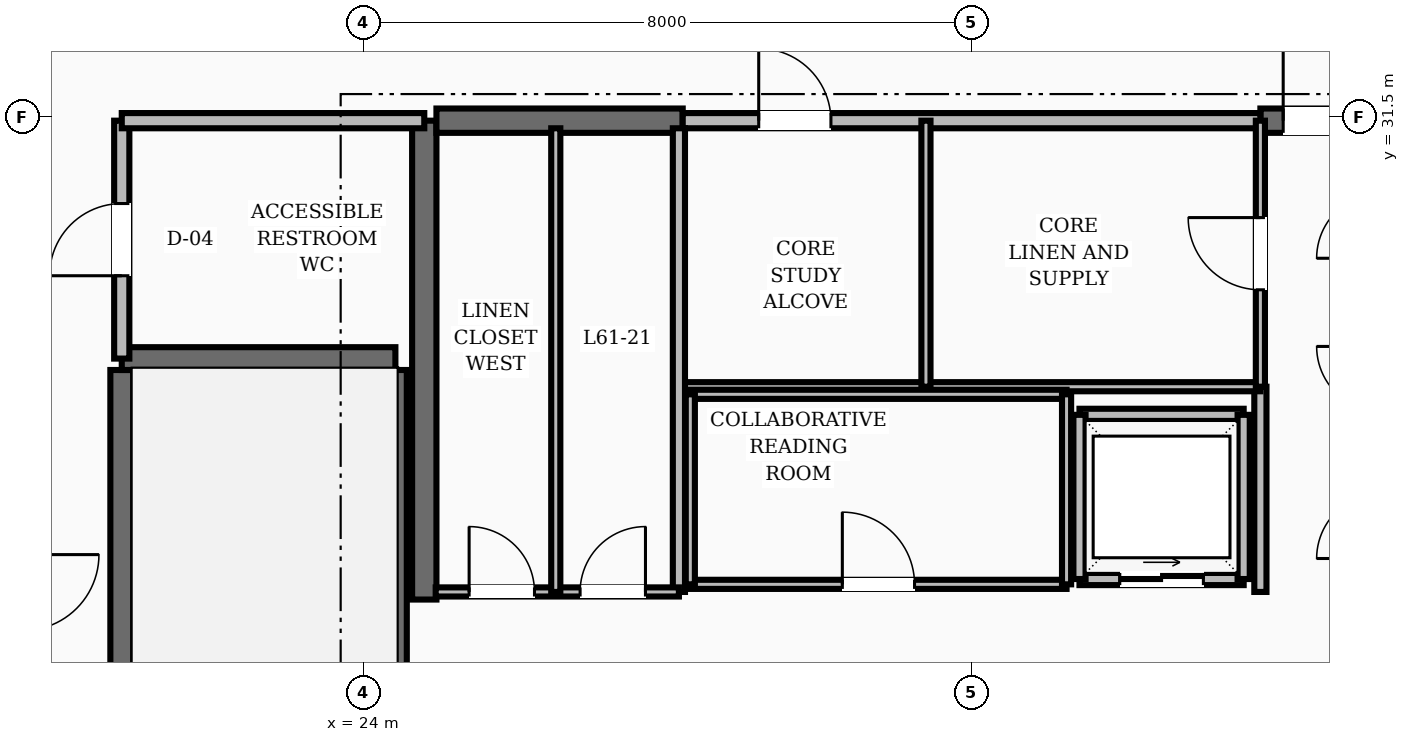
"""IFC4 building model, lengths in metres.
Left out: names, types, materials, properties, quantities, classifications, styles, units other than length and angle.
Written with IfcOpenShell. Run it as: python <this file> out.ifc"""

import sys

from ifc_helpers import new_model, si_unit, direction, frame, frame_2d, origin, place, context, subcontext, project, spatial, rectangle, extrude, element, fill, save


model = new_model("IFC4")
c1 = context("Model", 3, precision=1e-05, world=origin(), true_north=direction((0.0, 1.0)))
c2 = subcontext(c1, "Body", "Model", "MODEL_VIEW")
j1 = project(units=[si_unit("LENGTHUNIT", "METRE"), si_unit("PLANEANGLEUNIT", "RADIAN")], contexts=[c1])
p1 = place(None, origin())
s1 = spatial("IfcSite", under=j1, at=p1, CompositionType="ELEMENT")
p2 = place(p1, origin())
s2 = spatial("IfcBuilding", under=s1, at=p2, CompositionType="ELEMENT")
p3 = place(p2, frame((0.0, 0.0, 236.4)))
s3 = spatial("IfcBuildingStorey", under=s2, at=p3, CompositionType="ELEMENT", Elevation=236.4)
p4 = place(p3, frame((24.8, 25.15, 0.0), z_axis=(0.0, 0.0, 1.0), x_axis=(0.0, 1.0, 0.0)))
e1 = element("IfcWall", 1, at=p4, inside=s3, PredefinedType="SHEAR", context=c2, shape_type="SweptSolid", body=[
    extrude(rectangle(XDim=6.3, YDim=0.32, at=frame_2d((3.15, 0.0))), origin(), (0.0, 0.0, 1.0), 3.6),
])
p5 = place(p3, frame((24.96, 31.45, 0.0), z_axis=(0.0, 0.0, 1.0), x_axis=(1.0, 0.0, 0.0)))
e2 = element("IfcWall", 2, at=p5, inside=s3, PredefinedType="SHEAR", context=c2, shape_type="SweptSolid", body=[
    extrude(rectangle(XDim=3.24, YDim=0.32, at=frame_2d((1.62, 0.0))), origin(), (0.0, 0.0, 1.0), 3.6),
])
p6 = place(p3, frame((35.8, 31.45, 0.0), z_axis=(0.0, 0.0, 1.0), x_axis=(1.0, 0.0, 0.0)))
e3 = element("IfcWall", 3, at=p6, inside=s3, PredefinedType="SHEAR", context=c2, shape_type="SweptSolid", body=[
    extrude(rectangle(XDim=3.24, YDim=0.32, at=frame_2d((1.62, 0.0))), origin(), (0.0, 0.0, 1.0), 3.6),
])
p7 = place(p6, frame((0.3, 0.0, 0.0)))
e4 = element("IfcOpeningElement", 4, at=p7, cuts=e3, PredefinedType="OPENING", context=c2, shape_type="SweptSolid", body=[
    extrude(rectangle(XDim=1.1, YDim=2.1, at=frame_2d((0.55, 1.05))), frame((0.0, 0.17, 0.0), z_axis=(0.0, -1.0, 0.0), x_axis=(1.0, 0.0, 0.0)), (0.0, 0.0, 1.0), 0.34),
])
for number, where, z_axis, x_axis in (
    (5, (20.82, 19.43, 0.0), (0.0, 0.0, 1.0), (0.0, 1.0, 0.0)),
    (6, (24.42, 19.43, 0.0), (0.0, 0.0, 1.0), (0.0, 1.0, 0.0)),
):
    element("IfcWall", number, at=place(p3, frame(where, z_axis=z_axis, x_axis=x_axis)), inside=s3, PredefinedType="SHEAR", context=c2, shape_type="SweptSolid", body=[
        extrude(rectangle(XDim=8.74, YDim=0.3, at=frame_2d((4.37, 0.0))), origin(), (0.0, 0.0, 1.0), 3.6),
    ])
p8 = place(p3, frame((20.82, 28.32, 0.0), z_axis=(0.0, 0.0, 1.0), x_axis=(1.0, 0.0, 0.0)))
e7 = element("IfcWall", 7, at=p8, inside=s3, PredefinedType="SHEAR", context=c2, shape_type="SweptSolid", body=[
    extrude(rectangle(XDim=3.6, YDim=0.3, at=frame_2d((1.8, 0.0))), origin(), (0.0, 0.0, 1.0), 3.6),
])
p9 = place(p3, frame((20.82, 28.32, 0.0), z_axis=(0.0, 0.0, 1.0), x_axis=(0.0, 1.0, 0.0)))
e8 = element("IfcWall", 8, at=p9, inside=s3, PredefinedType="SOLIDWALL", context=c2, shape_type="SweptSolid", body=[
    extrude(rectangle(XDim=3.13, YDim=0.2, at=frame_2d((1.565, 0.0))), origin(), (0.0, 0.0, 1.0), 2.87),
])
p10 = place(p9, frame((1.09, 0.0, 0.0)))
e9 = element("IfcOpeningElement", 9, at=p10, cuts=e8, PredefinedType="OPENING", context=c2, shape_type="SweptSolid", body=[
    extrude(rectangle(XDim=0.95, YDim=2.1, at=frame_2d((0.475, 1.05))), frame((0.0, 0.11, 0.0), z_axis=(0.0, -1.0, 0.0), x_axis=(1.0, 0.0, 0.0)), (0.0, 0.0, 1.0), 0.22),
])
p11 = place(p3, frame((20.82, 31.45, 0.0), z_axis=(0.0, 0.0, 1.0), x_axis=(1.0, 0.0, 0.0)))
e10 = element("IfcWall", 10, at=p11, inside=s3, PredefinedType="SOLIDWALL", context=c2, shape_type="SweptSolid", body=[
    extrude(rectangle(XDim=3.98, YDim=0.2, at=frame_2d((1.99, 0.0))), origin(), (0.0, 0.0, 1.0), 2.87),
])
p12 = place(p3, frame((35.8, 25.25, 0.0), z_axis=(0.0, 0.0, 1.0), x_axis=(0.0, 1.0, 0.0)))
e11 = element("IfcWall", 11, at=p12, inside=s3, PredefinedType="SOLIDWALL", context=c2, shape_type="SweptSolid", body=[
    extrude(rectangle(XDim=2.7, YDim=0.16, at=frame_2d((1.35, 0.0))), origin(), (0.0, 0.0, 1.0), 2.87),
])
p13 = place(p3, frame((33.42, 25.42, 0.0), z_axis=(0.0, 0.0, 1.0), x_axis=(1.0, 0.0, 0.0)))
e12 = element("IfcWall", 12, at=p13, inside=s3, PredefinedType="SOLIDWALL", context=c2, shape_type="SweptSolid", body=[
    extrude(rectangle(XDim=2.16, YDim=0.16, at=frame_2d((1.08, 0.0))), origin(), (0.0, 0.0, 1.0), 2.87),
])
p14 = place(p13, frame((0.53, 0.0, 0.0)))
e13 = element("IfcOpeningElement", 13, at=p14, cuts=e12, PredefinedType="OPENING", context=c2, shape_type="SweptSolid", body=[
    extrude(rectangle(XDim=1.1, YDim=2.15, at=frame_2d((0.55, 1.075))), frame((0.0, 0.09, 0.0), z_axis=(0.0, -1.0, 0.0), x_axis=(1.0, 0.0, 0.0)), (0.0, 0.0, 1.0), 0.18),
])
for number, where, z_axis, x_axis in (
    (14, (33.42, 27.58, 0.0), (0.0, 0.0, 1.0), (1.0, 0.0, 0.0)),
    (15, (33.42, 25.42, 0.0), (0.0, 0.0, 1.0), (0.0, 1.0, 0.0)),
    (16, (35.58, 25.42, 0.0), (0.0, 0.0, 1.0), (0.0, 1.0, 0.0)),
):
    element("IfcWall", number, at=place(p3, frame(where, z_axis=z_axis, x_axis=x_axis)), inside=s3, PredefinedType="SOLIDWALL", context=c2, shape_type="SweptSolid", body=[
        extrude(rectangle(XDim=2.16, YDim=0.16, at=frame_2d((1.08, 0.0))), origin(), (0.0, 0.0, 1.0), 2.87),
    ])
p15 = place(p3, frame((28.2, 31.45, 0.0), z_axis=(0.0, 0.0, 1.0), x_axis=(1.0, 0.0, 0.0)))
e17 = element("IfcWall", 17, at=p15, inside=s3, PredefinedType="SOLIDWALL", context=c2, shape_type="SweptSolid", body=[
    extrude(rectangle(XDim=7.6, YDim=0.2, at=frame_2d((3.8, 0.0))), origin(), (0.0, 0.0, 1.0), 2.87),
])
p16 = place(p15, frame((1.0, 0.0, 0.0)))
e18 = element("IfcOpeningElement", 18, at=p16, cuts=e17, PredefinedType="OPENING", context=c2, shape_type="SweptSolid", body=[
    extrude(rectangle(XDim=0.95, YDim=2.1, at=frame_2d((0.475, 1.05))), frame((0.0, 0.11, 0.0), z_axis=(0.0, -1.0, 0.0), x_axis=(1.0, 0.0, 0.0)), (0.0, 0.0, 1.0), 0.22),
])
p17 = place(p3, frame((28.2, 27.95, 0.0), z_axis=(0.0, 0.0, 1.0), x_axis=(1.0, 0.0, 0.0)))
e19 = element("IfcWall", 19, at=p17, inside=s3, PredefinedType="PARTITIONING", context=c2, shape_type="SweptSolid", body=[
    extrude(rectangle(XDim=7.6, YDim=0.12, at=frame_2d((3.8, 0.0))), origin(), (0.0, 0.0, 1.0), 2.87),
])
p18 = place(p3, frame((35.8, 27.95, 0.0), z_axis=(0.0, 0.0, 1.0), x_axis=(0.0, 1.0, 0.0)))
e20 = element("IfcWall", 20, at=p18, inside=s3, PredefinedType="PARTITIONING", context=c2, shape_type="SweptSolid", body=[
    extrude(rectangle(XDim=3.5, YDim=0.12, at=frame_2d((1.75, 0.0))), origin(), (0.0, 0.0, 1.0), 2.87),
])
p19 = place(p18, frame((1.275, 0.0, 0.0)))
e21 = element("IfcOpeningElement", 21, at=p19, cuts=e20, PredefinedType="OPENING", context=c2, shape_type="SweptSolid", body=[
    extrude(rectangle(XDim=0.95, YDim=2.1, at=frame_2d((0.475, 1.05))), frame((0.0, 0.07, 0.0), z_axis=(0.0, -1.0, 0.0), x_axis=(1.0, 0.0, 0.0)), (0.0, 0.0, 1.0), 0.14),
])
p20 = place(p3, frame((31.4, 27.95, 0.0), z_axis=(0.0, 0.0, 1.0), x_axis=(0.0, 1.0, 0.0)))
e22 = element("IfcWall", 22, at=p20, inside=s3, PredefinedType="PARTITIONING", context=c2, shape_type="SweptSolid", body=[
    extrude(rectangle(XDim=3.5, YDim=0.12, at=frame_2d((1.75, 0.0))), origin(), (0.0, 0.0, 1.0), 2.87),
])
p21 = place(p3, frame((28.3, 25.35, 0.0), z_axis=(0.0, 0.0, 1.0), x_axis=(1.0, 0.0, 0.0)))
e23 = element("IfcWall", 23, at=p21, inside=s3, PredefinedType="PARTITIONING", context=c2, shape_type="SweptSolid", body=[
    extrude(rectangle(XDim=4.95, YDim=0.12, at=frame_2d((2.475, 0.0))), origin(), (0.0, 0.0, 1.0), 2.87),
])
p22 = place(p21, frame((2.0, 0.0, 0.0)))
e24 = element("IfcOpeningElement", 24, at=p22, cuts=e23, PredefinedType="OPENING", context=c2, shape_type="SweptSolid", body=[
    extrude(rectangle(XDim=0.95, YDim=2.1, at=frame_2d((0.475, 1.05))), frame((0.0, 0.07, 0.0), z_axis=(0.0, -1.0, 0.0), x_axis=(1.0, 0.0, 0.0)), (0.0, 0.0, 1.0), 0.14),
])
p23 = place(p3, frame((28.3, 27.85, 0.0), z_axis=(0.0, 0.0, 1.0), x_axis=(1.0, 0.0, 0.0)))
e25 = element("IfcWall", 25, at=p23, inside=s3, PredefinedType="PARTITIONING", context=c2, shape_type="SweptSolid", body=[
    extrude(rectangle(XDim=4.95, YDim=0.12, at=frame_2d((2.475, 0.0))), origin(), (0.0, 0.0, 1.0), 2.87),
])
for number, where, z_axis, x_axis in (
    (26, (28.3, 25.35, 0.0), (0.0, 0.0, 1.0), (0.0, 1.0, 0.0)),
    (27, (33.25, 25.35, 0.0), (0.0, 0.0, 1.0), (0.0, 1.0, 0.0)),
):
    element("IfcWall", number, at=place(p3, frame(where, z_axis=z_axis, x_axis=x_axis)), inside=s3, PredefinedType="PARTITIONING", context=c2, shape_type="SweptSolid", body=[
        extrude(rectangle(XDim=2.5, YDim=0.12, at=frame_2d((1.25, 0.0))), origin(), (0.0, 0.0, 1.0), 2.87),
    ])
p24 = place(p3, frame((28.15, 25.25, 0.0), z_axis=(0.0, 0.0, 1.0), x_axis=(0.0, 1.0, 0.0)))
e28 = element("IfcWall", 28, at=p24, inside=s3, PredefinedType="SOLIDWALL", context=c2, shape_type="SweptSolid", body=[
    extrude(rectangle(XDim=6.1, YDim=0.16, at=frame_2d((3.05, 0.0))), origin(), (0.0, 0.0, 1.0), 2.87),
])
p25 = place(p3, frame((24.95, 25.25, 0.0), z_axis=(0.0, 0.0, 1.0), x_axis=(1.0, 0.0, 0.0)))
e29 = element("IfcWall", 29, at=p25, inside=s3, PredefinedType="PARTITIONING", context=c2, shape_type="SweptSolid", body=[
    extrude(rectangle(XDim=3.2, YDim=0.12, at=frame_2d((1.6, 0.0))), origin(), (0.0, 0.0, 1.0), 2.87),
])
p26 = place(p25, frame((0.44, 0.0, 0.0)))
e30 = element("IfcOpeningElement", 30, at=p26, cuts=e29, PredefinedType="OPENING", context=c2, shape_type="SweptSolid", body=[
    extrude(rectangle(XDim=0.86, YDim=2.1, at=frame_2d((0.43, 1.05))), frame((0.0, 0.07, 0.0), z_axis=(0.0, -1.0, 0.0), x_axis=(1.0, 0.0, 0.0)), (0.0, 0.0, 1.0), 0.14),
])
p27 = place(p25, frame((1.9, 0.0, 0.0)))
e31 = element("IfcOpeningElement", 31, at=p27, cuts=e29, PredefinedType="OPENING", context=c2, shape_type="SweptSolid", body=[
    extrude(rectangle(XDim=0.86, YDim=2.1, at=frame_2d((0.43, 1.05))), frame((0.0, 0.07, 0.0), z_axis=(0.0, -1.0, 0.0), x_axis=(1.0, 0.0, 0.0)), (0.0, 0.0, 1.0), 0.14),
])
p28 = place(p3, frame((26.53, 25.25, 0.0), z_axis=(0.0, 0.0, 1.0), x_axis=(0.0, 1.0, 0.0)))
e32 = element("IfcWall", 32, at=p28, inside=s3, PredefinedType="PARTITIONING", context=c2, shape_type="SweptSolid", body=[
    extrude(rectangle(XDim=6.1, YDim=0.12, at=frame_2d((3.05, 0.0))), origin(), (0.0, 0.0, 1.0), 2.87),
])
p29 = place(p3, frame((21.635, 34.365, 0.0), z_axis=(0.0, 0.0, 1.0), x_axis=(-0.707106781187, -0.707106781187, 0.0)))
e33 = element("IfcWall", 33, at=p29, inside=s3, PredefinedType="SOLIDWALL", context=c2, shape_type="SweptSolid", body=[
    extrude(rectangle(XDim=2.916, YDim=0.16, at=frame_2d((1.458, 0.0))), origin(), (0.0, 0.0, 1.0), 2.87),
])
p30 = place(p10, origin())
e34 = element("IfcDoor", 34, at=p30, inside=s3, OperationType="SINGLE_SWING_LEFT", PredefinedType="DOOR", context=c2, shape_type="SweptSolid", body=[
    extrude(rectangle(XDim=0.95, YDim=2.1, at=frame_2d((0.475, 1.05))), frame((0.0, 0.025, 0.0), z_axis=(0.0, -1.0, 0.0), x_axis=(1.0, 0.0, 0.0)), (0.0, 0.0, 1.0), 0.05),
])
fill(e9, e34)
p31 = place(p7, origin())
e35 = element("IfcDoor", 35, at=p31, inside=s3, OperationType="SINGLE_SWING_LEFT", PredefinedType="DOOR", context=c2, shape_type="SweptSolid", body=[
    extrude(rectangle(XDim=1.1, YDim=2.1, at=frame_2d((0.55, 1.05))), frame((0.0, 0.025, 0.0), z_axis=(0.0, -1.0, 0.0), x_axis=(1.0, 0.0, 0.0)), (0.0, 0.0, 1.0), 0.05),
])
fill(e4, e35)
p32 = place(p14, origin())
e36 = element("IfcDoor", 36, at=p32, inside=s3, OperationType="SLIDING_TO_RIGHT", PredefinedType="DOOR", context=c2, shape_type="SweptSolid", body=[
    extrude(rectangle(XDim=1.1, YDim=2.15, at=frame_2d((0.55, 1.075))), frame((0.0, 0.025, 0.0), z_axis=(0.0, -1.0, 0.0), x_axis=(1.0, 0.0, 0.0)), (0.0, 0.0, 1.0), 0.05),
])
fill(e13, e36)
p33 = place(p16, origin())
e37 = element("IfcDoor", 37, at=p33, inside=s3, OperationType="SINGLE_SWING_LEFT", PredefinedType="DOOR", context=c2, shape_type="SweptSolid", body=[
    extrude(rectangle(XDim=0.95, YDim=2.1, at=frame_2d((0.475, 1.05))), frame((0.0, 0.025, 0.0), z_axis=(0.0, -1.0, 0.0), x_axis=(1.0, 0.0, 0.0)), (0.0, 0.0, 1.0), 0.05),
])
fill(e18, e37)
p34 = place(p19, origin())
e38 = element("IfcDoor", 38, at=p34, inside=s3, OperationType="SINGLE_SWING_RIGHT", PredefinedType="DOOR", context=c2, shape_type="SweptSolid", body=[
    extrude(rectangle(XDim=0.95, YDim=2.1, at=frame_2d((0.475, 1.05))), frame((0.0, 0.025, 0.0), z_axis=(0.0, -1.0, 0.0), x_axis=(1.0, 0.0, 0.0)), (0.0, 0.0, 1.0), 0.05),
])
fill(e21, e38)
p35 = place(p22, origin())
e39 = element("IfcDoor", 39, at=p35, inside=s3, OperationType="SINGLE_SWING_LEFT", PredefinedType="DOOR", context=c2, shape_type="SweptSolid", body=[
    extrude(rectangle(XDim=0.95, YDim=2.1, at=frame_2d((0.475, 1.05))), frame((0.0, 0.025, 0.0), z_axis=(0.0, -1.0, 0.0), x_axis=(1.0, 0.0, 0.0)), (0.0, 0.0, 1.0), 0.05),
])
fill(e24, e39)
p36 = place(p26, origin())
e40 = element("IfcDoor", 40, at=p36, inside=s3, OperationType="SINGLE_SWING_LEFT", PredefinedType="DOOR", context=c2, shape_type="SweptSolid", body=[
    extrude(rectangle(XDim=0.86, YDim=2.1, at=frame_2d((0.43, 1.05))), frame((0.0, 0.025, 0.0), z_axis=(0.0, -1.0, 0.0), x_axis=(1.0, 0.0, 0.0)), (0.0, 0.0, 1.0), 0.05),
])
fill(e30, e40)
p37 = place(p27, origin())
e41 = element("IfcDoor", 41, at=p37, inside=s3, OperationType="SINGLE_SWING_RIGHT", PredefinedType="DOOR", context=c2, shape_type="SweptSolid", body=[
    extrude(rectangle(XDim=0.86, YDim=2.1, at=frame_2d((0.43, 1.05))), frame((0.0, 0.025, 0.0), z_axis=(0.0, -1.0, 0.0), x_axis=(1.0, 0.0, 0.0)), (0.0, 0.0, 1.0), 0.05),
])
fill(e31, e41)
save(model, sys.argv[1])
